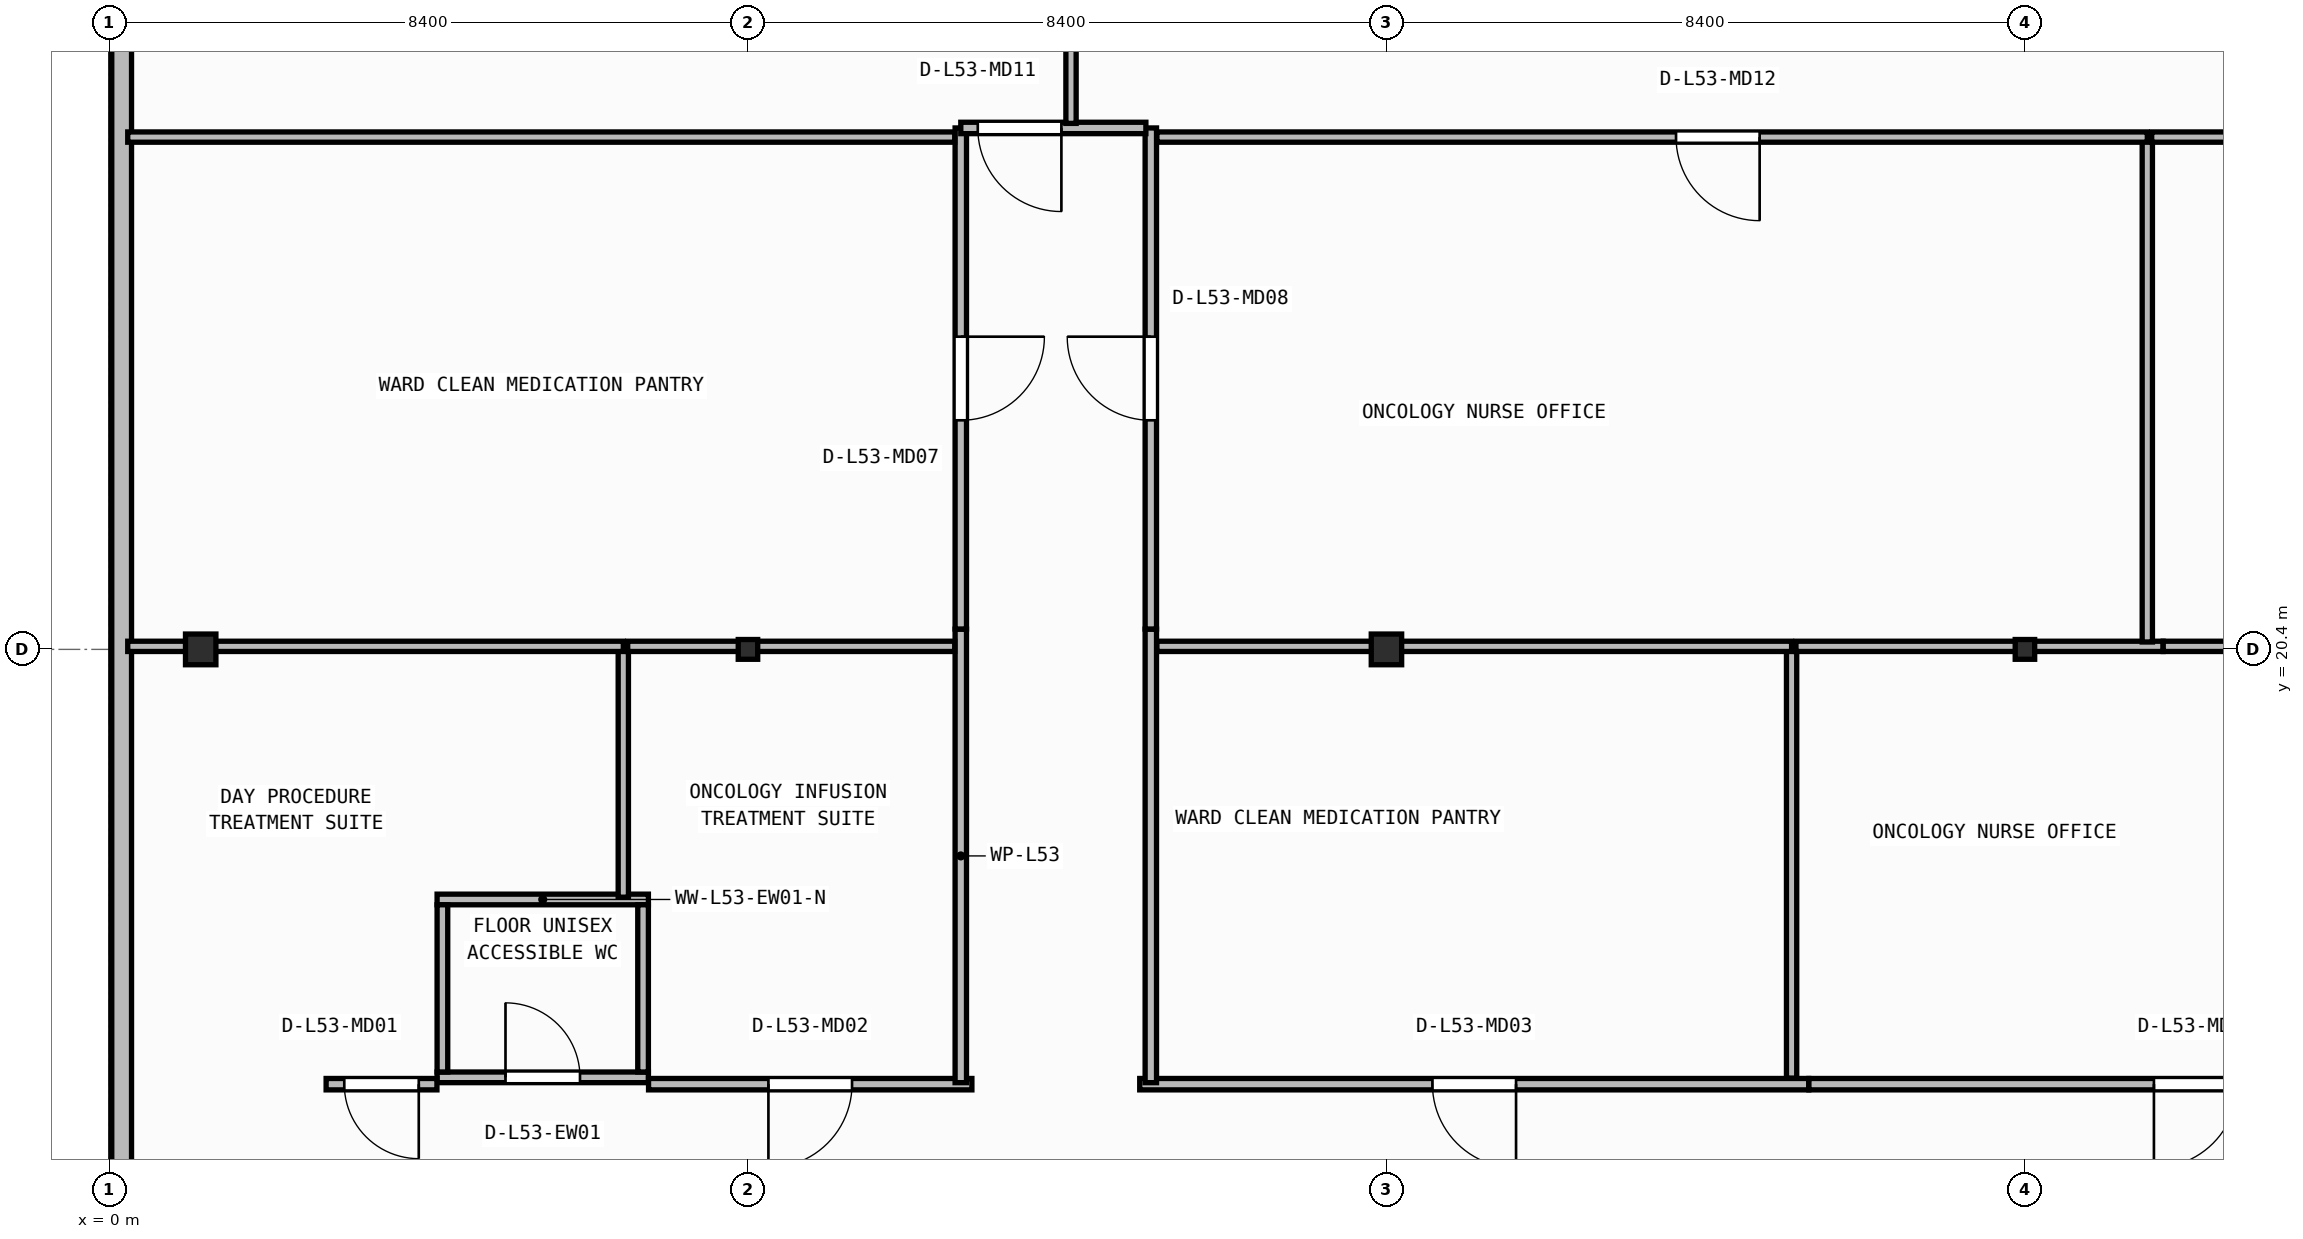
"""IFC4 building model, lengths in metres.
Left out: names, types, materials, properties, quantities, classifications, styles, units other than length and angle.
Written with IfcOpenShell. Run it as: python <this file> out.ifc"""

import sys

from ifc_helpers import new_model, si_unit, direction, frame, frame_2d, origin, origin_2d, place, context, subcontext, project, spatial, rectangle, i_section, extrude, element, fill, save


model = new_model("IFC4")
c1 = context("Model", 3, precision=1e-05, world=origin(), true_north=direction((0.0, 1.0)))
c2 = subcontext(c1, "Body", "Model", "MODEL_VIEW")
j1 = project(units=[si_unit("LENGTHUNIT", "METRE"), si_unit("PLANEANGLEUNIT", "RADIAN")], contexts=[c1])
p1 = place(None, origin())
s1 = spatial("IfcSite", under=j1, at=p1, CompositionType="ELEMENT")
p2 = place(p1, origin())
s2 = spatial("IfcBuilding", under=s1, at=p2, CompositionType="ELEMENT")
p3 = place(p2, frame((0.0, 0.0, 215.8)))
s3 = spatial("IfcBuildingStorey", under=s2, at=p3, CompositionType="ELEMENT", Elevation=215.8)
p4 = place(p3, frame((1.2, 20.4, 0.0), z_axis=(0.0, 0.0, 1.0), x_axis=(1.0, 0.0, 0.0)))
e1 = element("IfcColumn", 1, at=p4, inside=s3, PredefinedType="COLUMN", context=c2, shape_type="SweptSolid", body=[
    extrude(i_section(OverallWidth=0.4, OverallDepth=0.404, WebThickness=0.02, FlangeThickness=0.032, at=origin_2d()), origin(), (0.0, 0.0, 1.0), 3.95),
])
p5 = place(p3, frame((8.4, 20.4, 0.0), z_axis=(0.0, 0.0, 1.0), x_axis=(1.0, 0.0, 0.0)))
e2 = element("IfcColumn", 2, at=p5, inside=s3, PredefinedType="COLUMN", context=c2, shape_type="SweptSolid", body=[
    extrude(i_section(OverallWidth=0.256, OverallDepth=0.26, WebThickness=0.01, FlangeThickness=0.017, FilletRadius=0.013, at=origin_2d()), origin(), (0.0, 0.0, 1.0), 3.95),
])
p6 = place(p3, frame((16.8, 20.4, 0.0), z_axis=(0.0, 0.0, 1.0), x_axis=(1.0, 0.0, 0.0)))
e3 = element("IfcColumn", 3, at=p6, inside=s3, PredefinedType="COLUMN", context=c2, shape_type="SweptSolid", body=[
    extrude(i_section(OverallWidth=0.4, OverallDepth=0.404, WebThickness=0.02, FlangeThickness=0.032, at=origin_2d()), origin(), (0.0, 0.0, 1.0), 3.95),
])
p7 = place(p3, frame((25.2, 20.4, 0.0), z_axis=(0.0, 0.0, 1.0), x_axis=(1.0, 0.0, 0.0)))
e4 = element("IfcColumn", 4, at=p7, inside=s3, PredefinedType="COLUMN", context=c2, shape_type="SweptSolid", body=[
    extrude(i_section(OverallWidth=0.256, OverallDepth=0.26, WebThickness=0.01, FlangeThickness=0.017, FilletRadius=0.013, at=origin_2d()), origin(), (0.0, 0.0, 1.0), 3.95),
])
p8 = place(p3, frame((0.16, 40.14, 0.0), z_axis=(0.0, 0.0, 1.0), x_axis=(0.0, -1.0, 0.0)))
e5 = element("IfcWall", 5, at=p8, inside=s3, PredefinedType="STANDARD", context=c2, shape_type="SweptSolid", body=[
    extrude(rectangle(XDim=37.48, YDim=0.26, at=frame_2d((18.74, 0.0))), origin(), (0.0, 0.0, 1.0), 3.71),
])
p9 = place(p8, frame((27.4, 0.0, 0.9)))
e6 = element("IfcOpeningElement", 6, at=p9, cuts=e5, PredefinedType="OPENING", context=c2, shape_type="SweptSolid", body=[
    extrude(rectangle(XDim=2.4, YDim=1.65, at=frame_2d((1.2, 0.825))), frame((0.0, 0.14, 0.0), z_axis=(0.0, -1.0, 0.0), x_axis=(1.0, 0.0, 0.0)), (0.0, 0.0, 1.0), 0.28),
])
p10 = place(p3, frame((4.31, 14.77, 0.0), z_axis=(0.0, 0.0, 1.0), x_axis=(1.0, 0.0, 0.0)))
e7 = element("IfcWall", 7, at=p10, inside=s3, PredefinedType="PARTITIONING", context=c2, shape_type="SweptSolid", body=[
    extrude(rectangle(XDim=2.78, YDim=0.14, at=frame_2d((1.39, 0.0))), origin(), (0.0, 0.0, 1.0), 3.71),
])
p11 = place(p10, frame((0.9, 0.0, 0.0)))
e8 = element("IfcOpeningElement", 8, at=p11, cuts=e7, PredefinedType="OPENING", context=c2, shape_type="SweptSolid", body=[
    extrude(rectangle(XDim=0.98, YDim=2.1, at=frame_2d((0.49, 1.05))), frame((0.0, 0.08, 0.0), z_axis=(0.0, -1.0, 0.0), x_axis=(1.0, 0.0, 0.0)), (0.0, 0.0, 1.0), 0.16),
])
p12 = place(p3, frame((4.31, 17.11, 0.0), z_axis=(0.0, 0.0, 1.0), x_axis=(1.0, 0.0, 0.0)))
e9 = element("IfcWall", 9, at=p12, inside=s3, PredefinedType="PARTITIONING", context=c2, shape_type="SweptSolid", body=[
    extrude(rectangle(XDim=2.78, YDim=0.14, at=frame_2d((1.39, 0.0))), origin(), (0.0, 0.0, 1.0), 3.71),
])
for number, where, z_axis, x_axis in (
    (10, (4.38, 14.84, 0.0), (0.0, 0.0, 1.0), (0.0, 1.0, 0.0)),
    (11, (7.02, 14.84, 0.0), (0.0, 0.0, 1.0), (0.0, 1.0, 0.0)),
):
    element("IfcWall", number, at=place(p3, frame(where, z_axis=z_axis, x_axis=x_axis)), inside=s3, PredefinedType="PARTITIONING", context=c2, shape_type="SweptSolid", body=[
        extrude(rectangle(XDim=2.2, YDim=0.14, at=frame_2d((1.1, 0.0))), origin(), (0.0, 0.0, 1.0), 3.71),
    ])
p13 = place(p3, frame((4.308, 14.68, 0.0), z_axis=(0.0, 0.0, 1.0), x_axis=(-1.0, 0.0, 0.0)))
e12 = element("IfcWall", 12, at=p13, inside=s3, PredefinedType="PARTITIONING", context=c2, shape_type="SweptSolid", body=[
    extrude(rectangle(XDim=1.458, YDim=0.15, at=frame_2d((0.729, 0.0))), origin(), (0.0, 0.0, 1.0), 3.71),
])
p14 = place(p13, frame((0.239, 0.0, 0.0)))
e13 = element("IfcOpeningElement", 13, at=p14, cuts=e12, PredefinedType="OPENING", context=c2, shape_type="SweptSolid", body=[
    extrude(rectangle(XDim=0.98, YDim=2.1, at=frame_2d((0.49, 1.05))), frame((0.0, 0.085, 0.0), z_axis=(0.0, -1.0, 0.0), x_axis=(1.0, 0.0, 0.0)), (0.0, 0.0, 1.0), 0.17),
])
p15 = place(p3, frame((11.346, 14.68, 0.0), z_axis=(0.0, 0.0, 1.0), x_axis=(-1.0, 0.0, 0.0)))
e14 = element("IfcWall", 14, at=p15, inside=s3, PredefinedType="PARTITIONING", context=c2, shape_type="SweptSolid", body=[
    extrude(rectangle(XDim=4.254, YDim=0.15, at=frame_2d((2.127, 0.0))), origin(), (0.0, 0.0, 1.0), 3.71),
])
p16 = place(p15, frame((1.577, 0.0, 0.0)))
e15 = element("IfcOpeningElement", 15, at=p16, cuts=e14, PredefinedType="OPENING", context=c2, shape_type="SweptSolid", body=[
    extrude(rectangle(XDim=1.1, YDim=2.1, at=frame_2d((0.55, 1.05))), frame((0.0, 0.085, 0.0), z_axis=(0.0, -1.0, 0.0), x_axis=(1.0, 0.0, 0.0)), (0.0, 0.0, 1.0), 0.17),
])
p17 = place(p3, frame((22.356, 14.68, 0.0), z_axis=(0.0, 0.0, 1.0), x_axis=(-1.0, 0.0, 0.0)))
e16 = element("IfcWall", 16, at=p17, inside=s3, PredefinedType="PARTITIONING", context=c2, shape_type="SweptSolid", body=[
    extrude(rectangle(XDim=8.802, YDim=0.15, at=frame_2d((4.401, 0.0))), origin(), (0.0, 0.0, 1.0), 3.71),
])
p18 = place(p17, frame((3.851, 0.0, 0.0)))
e17 = element("IfcOpeningElement", 17, at=p18, cuts=e16, PredefinedType="OPENING", context=c2, shape_type="SweptSolid", body=[
    extrude(rectangle(XDim=1.1, YDim=2.1, at=frame_2d((0.55, 1.05))), frame((0.0, 0.085, 0.0), z_axis=(0.0, -1.0, 0.0), x_axis=(1.0, 0.0, 0.0)), (0.0, 0.0, 1.0), 0.17),
])
p19 = place(p3, frame((32.536, 14.68, 0.0), z_axis=(0.0, 0.0, 1.0), x_axis=(-1.0, 0.0, 0.0)))
e18 = element("IfcWall", 18, at=p19, inside=s3, PredefinedType="PARTITIONING", context=c2, shape_type="SweptSolid", body=[
    extrude(rectangle(XDim=10.178, YDim=0.15, at=frame_2d((5.089, 0.0))), origin(), (0.0, 0.0, 1.0), 3.71),
])
p20 = place(p19, frame((4.539, 0.0, 0.0)))
e19 = element("IfcOpeningElement", 19, at=p20, cuts=e18, PredefinedType="OPENING", context=c2, shape_type="SweptSolid", body=[
    extrude(rectangle(XDim=1.1, YDim=2.1, at=frame_2d((0.55, 1.05))), frame((0.0, 0.085, 0.0), z_axis=(0.0, -1.0, 0.0), x_axis=(1.0, 0.0, 0.0)), (0.0, 0.0, 1.0), 0.17),
])
for number, where, z_axis, x_axis in (
    (20, (11.2, 20.666, 0.0), (0.0, 0.0, 1.0), (0.0, -1.0, 0.0)),
    (21, (13.7, 14.7, 0.0), (0.0, 0.0, 1.0), (0.0, 1.0, 0.0)),
):
    element("IfcWall", number, at=place(p3, frame(where, z_axis=z_axis, x_axis=x_axis)), inside=s3, PredefinedType="PARTITIONING", context=c2, shape_type="SweptSolid", body=[
        extrude(rectangle(XDim=5.966, YDim=0.15, at=frame_2d((2.983, 0.0))), origin(), (0.0, 0.0, 1.0), 3.71),
    ])
p21 = place(p3, frame((11.2, 27.26, 0.0), z_axis=(0.0, 0.0, 1.0), x_axis=(0.0, -1.0, 0.0)))
e22 = element("IfcWall", 22, at=p21, inside=s3, PredefinedType="PARTITIONING", context=c2, shape_type="SweptSolid", body=[
    extrude(rectangle(XDim=6.592, YDim=0.15, at=frame_2d((3.296, 0.0))), origin(), (0.0, 0.0, 1.0), 3.71),
])
p22 = place(p21, frame((2.746, 0.0, 0.0)))
e23 = element("IfcOpeningElement", 23, at=p22, cuts=e22, PredefinedType="OPENING", context=c2, shape_type="SweptSolid", body=[
    extrude(rectangle(XDim=1.1, YDim=2.1, at=frame_2d((0.55, 1.05))), frame((0.0, 0.085, 0.0), z_axis=(0.0, -1.0, 0.0), x_axis=(1.0, 0.0, 0.0)), (0.0, 0.0, 1.0), 0.17),
])
p23 = place(p3, frame((13.7, 20.668, 0.0), z_axis=(0.0, 0.0, 1.0), x_axis=(0.0, 1.0, 0.0)))
e24 = element("IfcWall", 24, at=p23, inside=s3, PredefinedType="PARTITIONING", context=c2, shape_type="SweptSolid", body=[
    extrude(rectangle(XDim=6.592, YDim=0.15, at=frame_2d((3.296, 0.0))), origin(), (0.0, 0.0, 1.0), 3.71),
])
p24 = place(p23, frame((2.746, 0.0, 0.0)))
e25 = element("IfcOpeningElement", 25, at=p24, cuts=e24, PredefinedType="OPENING", context=c2, shape_type="SweptSolid", body=[
    extrude(rectangle(XDim=1.1, YDim=2.1, at=frame_2d((0.55, 1.05))), frame((0.0, 0.085, 0.0), z_axis=(0.0, -1.0, 0.0), x_axis=(1.0, 0.0, 0.0)), (0.0, 0.0, 1.0), 0.17),
])
p25 = place(p3, frame((13.635, 27.26, 0.0), z_axis=(0.0, 0.0, 1.0), x_axis=(-1.0, 0.0, 0.0)))
e26 = element("IfcWall", 26, at=p25, inside=s3, PredefinedType="PARTITIONING", context=c2, shape_type="SweptSolid", body=[
    extrude(rectangle(XDim=2.435, YDim=0.15, at=frame_2d((1.218, 0.0))), origin(), (0.0, 0.0, 1.0), 3.71),
])
p26 = place(p25, frame((1.112, 0.0, 0.0)))
e27 = element("IfcOpeningElement", 27, at=p26, cuts=e26, PredefinedType="OPENING", context=c2, shape_type="SweptSolid", body=[
    extrude(rectangle(XDim=1.1, YDim=2.1, at=frame_2d((0.55, 1.05))), frame((0.0, 0.085, 0.0), z_axis=(0.0, -1.0, 0.0), x_axis=(1.0, 0.0, 0.0)), (0.0, 0.0, 1.0), 0.17),
])
p27 = place(p3, frame((6.76, 17.14, 0.0), z_axis=(0.0, 0.0, 1.0), x_axis=(0.0, 1.0, 0.0)))
e28 = element("IfcWall", 28, at=p27, inside=s3, PredefinedType="PARTITIONING", context=c2, shape_type="SweptSolid", body=[
    extrude(rectangle(XDim=3.3, YDim=0.135, at=frame_2d((1.65, 0.0))), origin(), (0.0, 0.0, 1.0), 3.71),
])
p28 = place(p3, frame((6.76, 20.44, 0.0), z_axis=(0.0, 0.0, 1.0), x_axis=(-1.0, 0.0, 0.0)))
e29 = element("IfcWall", 29, at=p28, inside=s3, PredefinedType="PARTITIONING", context=c2, shape_type="SweptSolid", body=[
    extrude(rectangle(XDim=6.52, YDim=0.135, at=frame_2d((3.26, 0.0))), origin(), (0.0, 0.0, 1.0), 3.152),
])
p29 = place(p3, frame((11.12, 20.44, 0.0), z_axis=(0.0, 0.0, 1.0), x_axis=(-1.0, 0.0, 0.0)))
e30 = element("IfcWall", 30, at=p29, inside=s3, PredefinedType="PARTITIONING", context=c2, shape_type="SweptSolid", body=[
    extrude(rectangle(XDim=4.303, YDim=0.135, at=frame_2d((2.151, 0.0))), origin(), (0.0, 0.0, 1.0), 3.152),
])
p30 = place(p3, frame((22.13, 14.76, 0.0), z_axis=(0.0, 0.0, 1.0), x_axis=(0.0, 1.0, 0.0)))
e31 = element("IfcWall", 31, at=p30, inside=s3, PredefinedType="PARTITIONING", context=c2, shape_type="SweptSolid", body=[
    extrude(rectangle(XDim=5.68, YDim=0.135, at=frame_2d((2.84, 0.0))), origin(), (0.0, 0.0, 1.0), 3.71),
])
p31 = place(p3, frame((22.13, 20.44, 0.0), z_axis=(0.0, 0.0, 1.0), x_axis=(-1.0, 0.0, 0.0)))
e32 = element("IfcWall", 32, at=p31, inside=s3, PredefinedType="PARTITIONING", context=c2, shape_type="SweptSolid", body=[
    extrude(rectangle(XDim=8.35, YDim=0.135, at=frame_2d((4.175, 0.0))), origin(), (0.0, 0.0, 1.0), 3.152),
])
p32 = place(p3, frame((27.018, 20.44, 0.0), z_axis=(0.0, 0.0, 1.0), x_axis=(-1.0, 0.0, 0.0)))
e33 = element("IfcWall", 33, at=p32, inside=s3, PredefinedType="PARTITIONING", context=c2, shape_type="SweptSolid", body=[
    extrude(rectangle(XDim=4.83, YDim=0.135, at=frame_2d((2.415, 0.0))), origin(), (0.0, 0.0, 1.0), 3.152),
])
p33 = place(p3, frame((32.31, 20.44, 0.0), z_axis=(0.0, 0.0, 1.0), x_axis=(-1.0, 0.0, 0.0)))
e34 = element("IfcWall", 34, at=p33, inside=s3, PredefinedType="PARTITIONING", context=c2, shape_type="SweptSolid", body=[
    extrude(rectangle(XDim=5.291, YDim=0.135, at=frame_2d((2.645, 0.0))), origin(), (0.0, 0.0, 1.0), 3.152),
])
p34 = place(p33, frame((2.379, 0.0, 0.0)))
e35 = element("IfcOpeningElement", 35, at=p34, cuts=e34, PredefinedType="OPENING", context=c2, shape_type="SweptSolid", body=[
    extrude(rectangle(XDim=1.1, YDim=2.1, at=frame_2d((0.55, 1.05))), frame((0.0, 0.077, 0.0), z_axis=(0.0, -1.0, 0.0), x_axis=(1.0, 0.0, 0.0)), (0.0, 0.0, 1.0), 0.155),
])
p35 = place(p3, frame((11.12, 27.14, 0.0), z_axis=(0.0, 0.0, 1.0), x_axis=(-1.0, 0.0, 0.0)))
e36 = element("IfcWall", 36, at=p35, inside=s3, PredefinedType="PARTITIONING", context=c2, shape_type="SweptSolid", body=[
    extrude(rectangle(XDim=10.88, YDim=0.135, at=frame_2d((5.44, 0.0))), origin(), (0.0, 0.0, 1.0), 3.71),
])
p36 = place(p3, frame((26.81, 20.498, 0.0), z_axis=(0.0, 0.0, 1.0), x_axis=(0.0, 1.0, 0.0)))
e37 = element("IfcWall", 37, at=p36, inside=s3, PredefinedType="PARTITIONING", context=c2, shape_type="SweptSolid", body=[
    extrude(rectangle(XDim=6.642, YDim=0.135, at=frame_2d((3.321, 0.0))), origin(), (0.0, 0.0, 1.0), 3.71),
])
p37 = place(p3, frame((26.81, 27.14, 0.0), z_axis=(0.0, 0.0, 1.0), x_axis=(-1.0, 0.0, 0.0)))
e38 = element("IfcWall", 38, at=p37, inside=s3, PredefinedType="PARTITIONING", context=c2, shape_type="SweptSolid", body=[
    extrude(rectangle(XDim=13.03, YDim=0.135, at=frame_2d((6.515, 0.0))), origin(), (0.0, 0.0, 1.0), 3.71),
])
p38 = place(p37, frame((5.1, 0.0, 0.0)))
e39 = element("IfcOpeningElement", 39, at=p38, cuts=e38, PredefinedType="OPENING", context=c2, shape_type="SweptSolid", body=[
    extrude(rectangle(XDim=1.1, YDim=2.1, at=frame_2d((0.55, 1.05))), frame((0.0, 0.077, 0.0), z_axis=(0.0, -1.0, 0.0), x_axis=(1.0, 0.0, 0.0)), (0.0, 0.0, 1.0), 0.155),
])
p39 = place(p3, frame((28.988, 27.14, 0.0), z_axis=(0.0, 0.0, 1.0), x_axis=(-1.0, 0.0, 0.0)))
e40 = element("IfcWall", 40, at=p39, inside=s3, PredefinedType="PARTITIONING", context=c2, shape_type="SweptSolid", body=[
    extrude(rectangle(XDim=2.12, YDim=0.135, at=frame_2d((1.06, 0.0))), origin(), (0.0, 0.0, 1.0), 3.71),
])
p40 = place(p3, frame((12.65, 27.32, 0.0), z_axis=(0.0, 0.0, 1.0), x_axis=(0.0, 1.0, 0.0)))
e41 = element("IfcWall", 41, at=p40, inside=s3, PredefinedType="PARTITIONING", context=c2, shape_type="SweptSolid", body=[
    extrude(rectangle(XDim=8.724, YDim=0.135, at=frame_2d((4.362, 0.0))), origin(), (0.0, 0.0, 1.0), 3.71),
])
p41 = place(p11, origin())
e42 = element("IfcDoor", 42, at=p41, inside=s3, OperationType="SINGLE_SWING_LEFT", PredefinedType="DOOR", context=c2, shape_type="SweptSolid", body=[
    extrude(rectangle(XDim=0.98, YDim=2.1, at=frame_2d((0.49, 1.05))), frame((0.0, 0.025, 0.0), z_axis=(0.0, -1.0, 0.0), x_axis=(1.0, 0.0, 0.0)), (0.0, 0.0, 1.0), 0.05),
])
fill(e8, e42)
p42 = place(p14, origin())
e43 = element("IfcDoor", 43, at=p42, inside=s3, OperationType="SINGLE_SWING_LEFT", PredefinedType="DOOR", context=c2, shape_type="SweptSolid", body=[
    extrude(rectangle(XDim=0.98, YDim=2.1, at=frame_2d((0.49, 1.05))), frame((0.0, 0.025, 0.0), z_axis=(0.0, -1.0, 0.0), x_axis=(1.0, 0.0, 0.0)), (0.0, 0.0, 1.0), 0.05),
])
fill(e13, e43)
p43 = place(p16, origin())
e44 = element("IfcDoor", 44, at=p43, inside=s3, OperationType="SINGLE_SWING_RIGHT", PredefinedType="DOOR", context=c2, shape_type="SweptSolid", body=[
    extrude(rectangle(XDim=1.1, YDim=2.1, at=frame_2d((0.55, 1.05))), frame((0.0, 0.025, 0.0), z_axis=(0.0, -1.0, 0.0), x_axis=(1.0, 0.0, 0.0)), (0.0, 0.0, 1.0), 0.05),
])
fill(e15, e44)
p44 = place(p18, origin())
e45 = element("IfcDoor", 45, at=p44, inside=s3, OperationType="SINGLE_SWING_LEFT", PredefinedType="DOOR", context=c2, shape_type="SweptSolid", body=[
    extrude(rectangle(XDim=1.1, YDim=2.1, at=frame_2d((0.55, 1.05))), frame((0.0, 0.025, 0.0), z_axis=(0.0, -1.0, 0.0), x_axis=(1.0, 0.0, 0.0)), (0.0, 0.0, 1.0), 0.05),
])
fill(e17, e45)
p45 = place(p20, origin())
e46 = element("IfcDoor", 46, at=p45, inside=s3, OperationType="SINGLE_SWING_RIGHT", PredefinedType="DOOR", context=c2, shape_type="SweptSolid", body=[
    extrude(rectangle(XDim=1.1, YDim=2.1, at=frame_2d((0.55, 1.05))), frame((0.0, 0.025, 0.0), z_axis=(0.0, -1.0, 0.0), x_axis=(1.0, 0.0, 0.0)), (0.0, 0.0, 1.0), 0.05),
])
fill(e19, e46)
p46 = place(p22, origin())
e47 = element("IfcDoor", 47, at=p46, inside=s3, OperationType="SINGLE_SWING_LEFT", PredefinedType="DOOR", context=c2, shape_type="SweptSolid", body=[
    extrude(rectangle(XDim=1.1, YDim=2.1, at=frame_2d((0.55, 1.05))), frame((0.0, 0.025, 0.0), z_axis=(0.0, -1.0, 0.0), x_axis=(1.0, 0.0, 0.0)), (0.0, 0.0, 1.0), 0.05),
])
fill(e23, e47)
p47 = place(p24, origin())
e48 = element("IfcDoor", 48, at=p47, inside=s3, OperationType="SINGLE_SWING_RIGHT", PredefinedType="DOOR", context=c2, shape_type="SweptSolid", body=[
    extrude(rectangle(XDim=1.1, YDim=2.1, at=frame_2d((0.55, 1.05))), frame((0.0, 0.025, 0.0), z_axis=(0.0, -1.0, 0.0), x_axis=(1.0, 0.0, 0.0)), (0.0, 0.0, 1.0), 0.05),
])
fill(e25, e48)
p48 = place(p26, origin())
e49 = element("IfcDoor", 49, at=p48, inside=s3, OperationType="SINGLE_SWING_LEFT", PredefinedType="DOOR", context=c2, shape_type="SweptSolid", body=[
    extrude(rectangle(XDim=1.1, YDim=2.1, at=frame_2d((0.55, 1.05))), frame((0.0, 0.025, 0.0), z_axis=(0.0, -1.0, 0.0), x_axis=(1.0, 0.0, 0.0)), (0.0, 0.0, 1.0), 0.05),
])
fill(e27, e49)
p49 = place(p38, origin())
e50 = element("IfcDoor", 50, at=p49, inside=s3, OperationType="SINGLE_SWING_LEFT", PredefinedType="DOOR", context=c2, shape_type="SweptSolid", body=[
    extrude(rectangle(XDim=1.1, YDim=2.1, at=frame_2d((0.55, 1.05))), frame((0.0, 0.025, 0.0), z_axis=(0.0, -1.0, 0.0), x_axis=(1.0, 0.0, 0.0)), (0.0, 0.0, 1.0), 0.05),
])
fill(e39, e50)
save(model, sys.argv[1])
